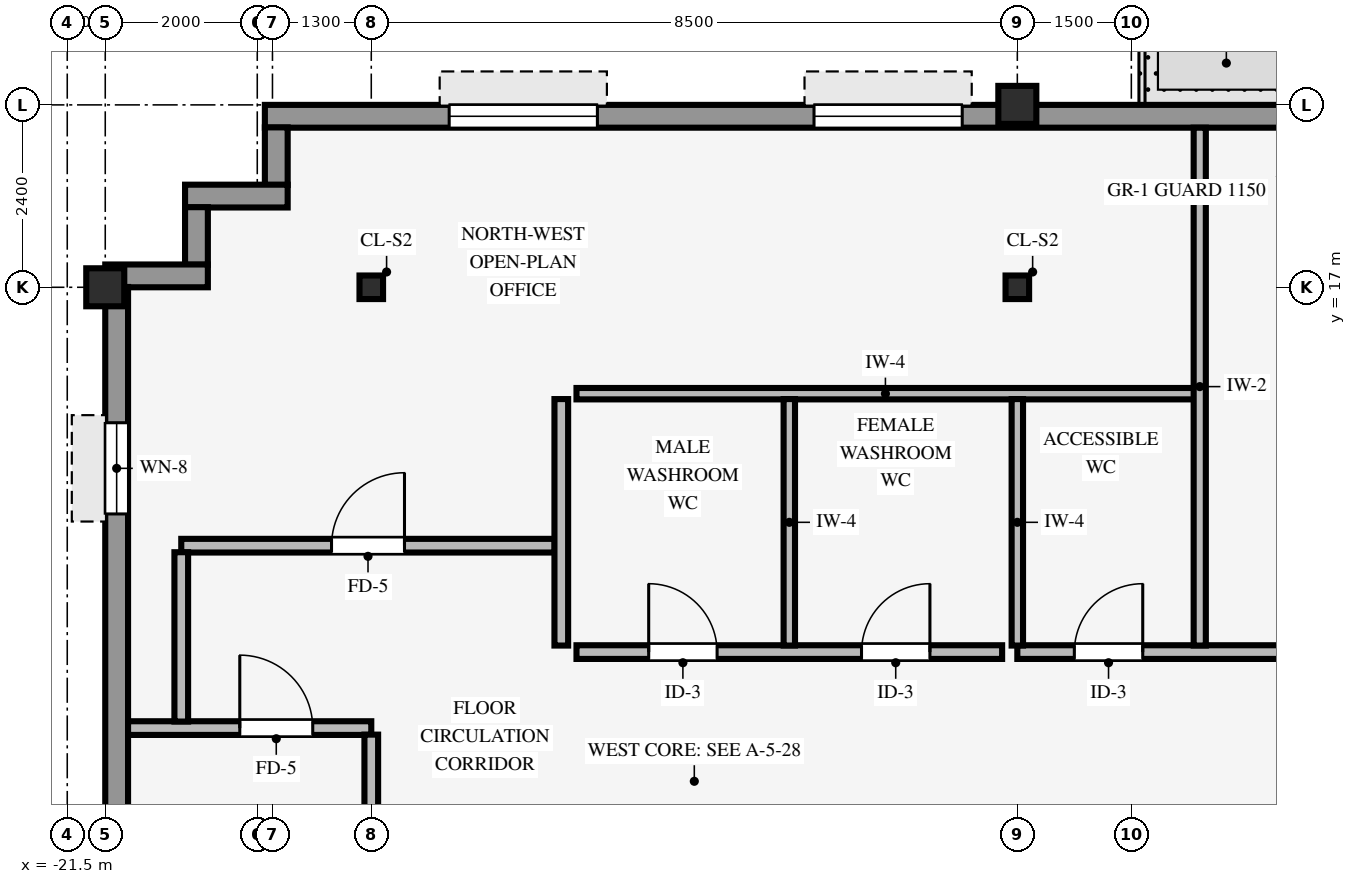
"""IFC4 building model, lengths in metres.
Left out: names, types, materials, properties, quantities, classifications, styles, units other than length and angle.
Written with IfcOpenShell. Run it as: python <this file> out.ifc"""

import sys

from ifc_helpers import new_model, si_unit, direction, frame, frame_2d, origin, origin_2d, place, context, subcontext, project, spatial, rectangle, hollow_rectangle, i_section, extrude, source, transform, mapped, element, fill, save


model = new_model("IFC4")
c1 = context("Model", 3, precision=1e-05, world=origin(), true_north=direction((0.0, 1.0)))
c2 = subcontext(c1, "Body", "Model", "MODEL_VIEW")
j1 = project(units=[si_unit("LENGTHUNIT", "METRE"), si_unit("PLANEANGLEUNIT", "RADIAN")], contexts=[c1])
p1 = place(None, origin())
s1 = spatial("IfcSite", under=j1, at=p1, CompositionType="ELEMENT")
p2 = place(p1, origin())
s2 = spatial("IfcBuilding", under=s1, at=p2, CompositionType="ELEMENT")
p3 = place(p2, frame((0.0, 0.0, 257.95)))
s3 = spatial("IfcBuildingStorey", under=s2, at=p3, CompositionType="ELEMENT", Elevation=257.95)
for number, where, z_axis, x_axis in (
    (1, (-21.0, 17.0, 0.0), (0.0, 0.0, 1.0), (1.0, 0.0, 0.0)),
    (2, (-9.0, 19.4, 0.0), (0.0, 0.0, 1.0), (1.0, 0.0, 0.0)),
):
    element("IfcColumn", number, at=place(p3, frame(where, z_axis=z_axis, x_axis=x_axis)), inside=s3, PredefinedType="COLUMN", context=c2, shape_type="SweptSolid", body=[
        extrude(hollow_rectangle(XDim=0.5, YDim=0.5, WallThickness=0.032, InnerFilletRadius=0.032, OuterFilletRadius=0.064, at=origin_2d()), origin(), (0.0, 0.0, 1.0), 3.37),
    ])
for number, where, z_axis, x_axis in (
    (3, (-17.5, 17.0, 0.0), (0.0, 0.0, 1.0), (1.0, 0.0, 0.0)),
    (4, (-9.0, 17.0, 0.0), (0.0, 0.0, 1.0), (1.0, 0.0, 0.0)),
):
    element("IfcColumn", number, at=place(p3, frame(where, z_axis=z_axis, x_axis=x_axis)), inside=s3, PredefinedType="COLUMN", context=c2, shape_type="SweptSolid", body=[
        extrude(i_section(OverallWidth=0.31, OverallDepth=0.31, WebThickness=0.015, FlangeThickness=0.015, FilletRadius=0.015, at=origin_2d()), origin(), (0.0, 0.0, 1.0), 3.37),
    ])
p4 = place(p3, frame((-18.9, 19.25, 0.0), z_axis=(0.0, 0.0, 1.0), x_axis=(1.0, 0.0, 0.0)))
e5 = element("IfcWall", 5, at=p4, inside=s3, PredefinedType="STANDARD", context=c2, shape_type="SweptSolid", body=[
    extrude(rectangle(XDim=35.6, YDim=0.3, at=frame_2d((17.8, 0.0))), origin(), (0.0, 0.0, 1.0), 2.705),
])
p5 = place(p4, frame((13.6, 0.0, 0.0)))
e6 = element("IfcOpeningElement", 6, at=p5, cuts=e5, PredefinedType="OPENING", context=c2, shape_type="SweptSolid", body=[
    extrude(rectangle(XDim=0.98, YDim=2.15, at=frame_2d((0.49, 1.075))), frame((0.0, 0.16, 0.0), z_axis=(0.0, -1.0, 0.0), x_axis=(1.0, 0.0, 0.0)), (0.0, 0.0, 1.0), 0.32),
])
p6 = place(p4, frame((2.425, 0.0, 0.8)))
e7 = element("IfcOpeningElement", 7, at=p6, cuts=e5, PredefinedType="OPENING", context=c2, shape_type="SweptSolid", body=[
    extrude(rectangle(XDim=1.95, YDim=1.48, at=frame_2d((0.975, 0.74))), frame((0.0, 0.16, 0.0), z_axis=(0.0, -1.0, 0.0), x_axis=(1.0, 0.0, 0.0)), (0.0, 0.0, 1.0), 0.32),
])
p7 = place(p4, frame((7.225, 0.0, 0.8)))
e8 = element("IfcOpeningElement", 8, at=p7, cuts=e5, PredefinedType="OPENING", context=c2, shape_type="SweptSolid", body=[
    extrude(rectangle(XDim=1.95, YDim=1.48, at=frame_2d((0.975, 0.74))), frame((0.0, 0.16, 0.0), z_axis=(0.0, -1.0, 0.0), x_axis=(1.0, 0.0, 0.0)), (0.0, 0.0, 1.0), 0.32),
])
p8 = place(p4, frame((15.475, 0.0, 0.8)))
e9 = element("IfcOpeningElement", 9, at=p8, cuts=e5, PredefinedType="OPENING", context=c2, shape_type="SweptSolid", body=[
    extrude(rectangle(XDim=1.95, YDim=1.48, at=frame_2d((0.975, 0.74))), frame((0.0, 0.16, 0.0), z_axis=(0.0, -1.0, 0.0), x_axis=(1.0, 0.0, 0.0)), (0.0, 0.0, 1.0), 0.32),
])
p9 = place(p4, frame((21.625, 0.0, 0.8)))
e10 = element("IfcOpeningElement", 10, at=p9, cuts=e5, PredefinedType="OPENING", context=c2, shape_type="SweptSolid", body=[
    extrude(rectangle(XDim=1.95, YDim=1.48, at=frame_2d((0.975, 0.74))), frame((0.0, 0.16, 0.0), z_axis=(0.0, -1.0, 0.0), x_axis=(1.0, 0.0, 0.0)), (0.0, 0.0, 1.0), 0.32),
])
p10 = place(p4, frame((32.575, 0.0, 0.8)))
e11 = element("IfcOpeningElement", 11, at=p10, cuts=e5, PredefinedType="OPENING", context=c2, shape_type="SweptSolid", body=[
    extrude(rectangle(XDim=1.95, YDim=1.48, at=frame_2d((0.975, 0.74))), frame((0.0, 0.16, 0.0), z_axis=(0.0, -1.0, 0.0), x_axis=(1.0, 0.0, 0.0)), (0.0, 0.0, 1.0), 0.32),
])
p11 = place(p3, frame((-18.75, 18.346, 0.0), z_axis=(0.0, 0.0, 1.0), x_axis=(0.0, 1.0, 0.0)))
e12 = element("IfcWall", 12, at=p11, inside=s3, PredefinedType="STANDARD", context=c2, shape_type="SweptSolid", body=[
    extrude(rectangle(XDim=0.758, YDim=0.3, at=frame_2d((0.379, 0.0))), origin(), (0.0, 0.0, 1.0), 2.892),
])
p12 = place(p3, frame((-19.95, 18.2, 0.0), z_axis=(0.0, 0.0, 1.0), x_axis=(1.0, 0.0, 0.0)))
e13 = element("IfcWall", 13, at=p12, inside=s3, PredefinedType="STANDARD", context=c2, shape_type="SweptSolid", body=[
    extrude(rectangle(XDim=1.35, YDim=0.3, at=frame_2d((0.675, 0.0))), origin(), (0.0, 0.0, 1.0), 2.892),
])
p13 = place(p3, frame((-19.8, 17.296, 0.0), z_axis=(0.0, 0.0, 1.0), x_axis=(0.0, 1.0, 0.0)))
e14 = element("IfcWall", 14, at=p13, inside=s3, PredefinedType="STANDARD", context=c2, shape_type="SweptSolid", body=[
    extrude(rectangle(XDim=0.758, YDim=0.3, at=frame_2d((0.379, 0.0))), origin(), (0.0, 0.0, 1.0), 2.892),
])
p14 = place(p3, frame((-21.0, 17.15, 0.0), z_axis=(0.0, 0.0, 1.0), x_axis=(1.0, 0.0, 0.0)))
e15 = element("IfcWall", 15, at=p14, inside=s3, PredefinedType="STANDARD", context=c2, shape_type="SweptSolid", body=[
    extrude(rectangle(XDim=1.35, YDim=0.3, at=frame_2d((0.675, 0.0))), origin(), (0.0, 0.0, 1.0), 2.892),
])
p15 = place(p3, frame((-20.85, -17.004, 0.0), z_axis=(0.0, 0.0, 1.0), x_axis=(0.0, 1.0, 0.0)))
e16 = element("IfcWall", 16, at=p15, inside=s3, PredefinedType="STANDARD", context=c2, shape_type="SweptSolid", body=[
    extrude(rectangle(XDim=34.008, YDim=0.3, at=frame_2d((17.004, 0.0))), origin(), (0.0, 0.0, 1.0), 2.705),
])
p16 = place(p15, frame((1.786, 0.0, 0.8)))
e17 = element("IfcOpeningElement", 17, at=p16, cuts=e16, PredefinedType="OPENING", context=c2, shape_type="SweptSolid", body=[
    extrude(rectangle(XDim=1.2, YDim=1.48, at=frame_2d((0.6, 0.74))), frame((0.0, 0.16, 0.0), z_axis=(0.0, -1.0, 0.0), x_axis=(1.0, 0.0, 0.0)), (0.0, 0.0, 1.0), 0.32),
])
p17 = place(p15, frame((8.159, 0.0, 0.8)))
e18 = element("IfcOpeningElement", 18, at=p17, cuts=e16, PredefinedType="OPENING", context=c2, shape_type="SweptSolid", body=[
    extrude(rectangle(XDim=1.2, YDim=1.48, at=frame_2d((0.6, 0.74))), frame((0.0, 0.16, 0.0), z_axis=(0.0, -1.0, 0.0), x_axis=(1.0, 0.0, 0.0)), (0.0, 0.0, 1.0), 0.32),
])
p18 = place(p15, frame((11.831, 0.0, 0.8)))
e19 = element("IfcOpeningElement", 19, at=p18, cuts=e16, PredefinedType="OPENING", context=c2, shape_type="SweptSolid", body=[
    extrude(rectangle(XDim=1.2, YDim=1.48, at=frame_2d((0.6, 0.74))), frame((0.0, 0.16, 0.0), z_axis=(0.0, -1.0, 0.0), x_axis=(1.0, 0.0, 0.0)), (0.0, 0.0, 1.0), 0.32),
])
p19 = place(p15, frame((17.754, 0.0, 0.8)))
e20 = element("IfcOpeningElement", 20, at=p19, cuts=e16, PredefinedType="OPENING", context=c2, shape_type="SweptSolid", body=[
    extrude(rectangle(XDim=1.2, YDim=1.48, at=frame_2d((0.6, 0.74))), frame((0.0, 0.16, 0.0), z_axis=(0.0, -1.0, 0.0), x_axis=(1.0, 0.0, 0.0)), (0.0, 0.0, 1.0), 0.32),
])
p20 = place(p15, frame((20.977, 0.0, 0.8)))
e21 = element("IfcOpeningElement", 21, at=p20, cuts=e16, PredefinedType="OPENING", context=c2, shape_type="SweptSolid", body=[
    extrude(rectangle(XDim=1.2, YDim=1.48, at=frame_2d((0.6, 0.74))), frame((0.0, 0.16, 0.0), z_axis=(0.0, -1.0, 0.0), x_axis=(1.0, 0.0, 0.0)), (0.0, 0.0, 1.0), 0.32),
])
p21 = place(p15, frame((24.649, 0.0, 0.8)))
e22 = element("IfcOpeningElement", 22, at=p21, cuts=e16, PredefinedType="OPENING", context=c2, shape_type="SweptSolid", body=[
    extrude(rectangle(XDim=1.2, YDim=1.48, at=frame_2d((0.6, 0.74))), frame((0.0, 0.16, 0.0), z_axis=(0.0, -1.0, 0.0), x_axis=(1.0, 0.0, 0.0)), (0.0, 0.0, 1.0), 0.32),
])
p22 = place(p15, frame((31.022, 0.0, 0.8)))
e23 = element("IfcOpeningElement", 23, at=p22, cuts=e16, PredefinedType="OPENING", context=c2, shape_type="SweptSolid", body=[
    extrude(rectangle(XDim=1.2, YDim=1.48, at=frame_2d((0.6, 0.74))), frame((0.0, 0.16, 0.0), z_axis=(0.0, -1.0, 0.0), x_axis=(1.0, 0.0, 0.0)), (0.0, 0.0, 1.0), 0.32),
])
p23 = place(p3, frame((-20.7, 11.2, 0.0), z_axis=(0.0, 0.0, 1.0), x_axis=(1.0, 0.0, 0.0)))
e24 = element("IfcWall", 24, at=p23, inside=s3, PredefinedType="PARTITIONING", context=c2, shape_type="SweptSolid", body=[
    extrude(rectangle(XDim=3.2, YDim=0.18, at=frame_2d((1.6, 0.0))), origin(), (0.0, 0.0, 1.0), 3.36),
])
p24 = place(p23, frame((1.47, 0.0, 0.0)))
e25 = element("IfcOpeningElement", 25, at=p24, cuts=e24, PredefinedType="OPENING", context=c2, shape_type="SweptSolid", body=[
    extrude(rectangle(XDim=0.96, YDim=2.1, at=frame_2d((0.48, 1.05))), frame((0.0, 0.1, 0.0), z_axis=(0.0, -1.0, 0.0), x_axis=(1.0, 0.0, 0.0)), (0.0, 0.0, 1.0), 0.2),
])
p25 = place(p3, frame((-14.8, 12.2, 0.0), z_axis=(0.0, 0.0, 1.0), x_axis=(1.0, 0.0, 0.0)))
e26 = element("IfcWall", 26, at=p25, inside=s3, PredefinedType="PARTITIONING", context=c2, shape_type="SweptSolid", body=[
    extrude(rectangle(XDim=5.6, YDim=0.18, at=frame_2d((2.8, 0.0))), origin(), (0.0, 0.0, 1.0), 3.36),
])
p26 = place(p25, frame((0.95, 0.0, 0.0)))
e27 = element("IfcOpeningElement", 27, at=p26, cuts=e26, PredefinedType="OPENING", context=c2, shape_type="SweptSolid", body=[
    extrude(rectangle(XDim=0.9, YDim=2.1, at=frame_2d((0.45, 1.05))), frame((0.0, 0.1, 0.0), z_axis=(0.0, -1.0, 0.0), x_axis=(1.0, 0.0, 0.0)), (0.0, 0.0, 1.0), 0.2),
])
p27 = place(p25, frame((3.75, 0.0, 0.0)))
e28 = element("IfcOpeningElement", 28, at=p27, cuts=e26, PredefinedType="OPENING", context=c2, shape_type="SweptSolid", body=[
    extrude(rectangle(XDim=0.9, YDim=2.1, at=frame_2d((0.45, 1.05))), frame((0.0, 0.1, 0.0), z_axis=(0.0, -1.0, 0.0), x_axis=(1.0, 0.0, 0.0)), (0.0, 0.0, 1.0), 0.2),
])
p28 = place(p3, frame((-9.0, 12.2, 0.0), z_axis=(0.0, 0.0, 1.0), x_axis=(1.0, 0.0, 0.0)))
e29 = element("IfcWall", 29, at=p28, inside=s3, PredefinedType="PARTITIONING", context=c2, shape_type="SweptSolid", body=[
    extrude(rectangle(XDim=24.8, YDim=0.18, at=frame_2d((12.4, 0.0))), origin(), (0.0, 0.0, 1.0), 3.36),
])
p29 = place(p28, frame((11.42, 0.0, 0.0)))
e30 = element("IfcOpeningElement", 30, at=p29, cuts=e29, PredefinedType="OPENING", context=c2, shape_type="SweptSolid", body=[
    extrude(rectangle(XDim=0.96, YDim=2.1, at=frame_2d((0.48, 1.05))), frame((0.0, 0.1, 0.0), z_axis=(0.0, -1.0, 0.0), x_axis=(1.0, 0.0, 0.0)), (0.0, 0.0, 1.0), 0.2),
])
p30 = place(p28, frame((4.82, 0.0, 0.0)))
e31 = element("IfcOpeningElement", 31, at=p30, cuts=e29, PredefinedType="OPENING", context=c2, shape_type="SweptSolid", body=[
    extrude(rectangle(XDim=0.96, YDim=2.1, at=frame_2d((0.48, 1.05))), frame((0.0, 0.1, 0.0), z_axis=(0.0, -1.0, 0.0), x_axis=(1.0, 0.0, 0.0)), (0.0, 0.0, 1.0), 0.2),
])
p31 = place(p28, frame((19.52, 0.0, 0.0)))
e32 = element("IfcOpeningElement", 32, at=p31, cuts=e29, PredefinedType="OPENING", context=c2, shape_type="SweptSolid", body=[
    extrude(rectangle(XDim=0.96, YDim=2.1, at=frame_2d((0.48, 1.05))), frame((0.0, 0.1, 0.0), z_axis=(0.0, -1.0, 0.0), x_axis=(1.0, 0.0, 0.0)), (0.0, 0.0, 1.0), 0.2),
])
p32 = place(p28, frame((22.92, 0.0, 0.0)))
e33 = element("IfcOpeningElement", 33, at=p32, cuts=e29, PredefinedType="OPENING", context=c2, shape_type="SweptSolid", body=[
    extrude(rectangle(XDim=0.96, YDim=2.1, at=frame_2d((0.48, 1.05))), frame((0.0, 0.1, 0.0), z_axis=(0.0, -1.0, 0.0), x_axis=(1.0, 0.0, 0.0)), (0.0, 0.0, 1.0), 0.2),
])
p33 = place(p28, frame((0.75, 0.0, 0.0)))
e34 = element("IfcOpeningElement", 34, at=p33, cuts=e29, PredefinedType="OPENING", context=c2, shape_type="SweptSolid", body=[
    extrude(rectangle(XDim=0.9, YDim=2.1, at=frame_2d((0.45, 1.05))), frame((0.0, 0.1, 0.0), z_axis=(0.0, -1.0, 0.0), x_axis=(1.0, 0.0, 0.0)), (0.0, 0.0, 1.0), 0.2),
])
p34 = place(p3, frame((-20.0, 13.6, 0.0), z_axis=(0.0, 0.0, 1.0), x_axis=(1.0, 0.0, 0.0)))
e35 = element("IfcWall", 35, at=p34, inside=s3, PredefinedType="PARTITIONING", context=c2, shape_type="SweptSolid", body=[
    extrude(rectangle(XDim=4.914, YDim=0.18, at=frame_2d((2.457, 0.0))), origin(), (0.0, 0.0, 1.0), 3.038),
])
p35 = place(p34, frame((1.977, 0.0, 0.0)))
e36 = element("IfcOpeningElement", 36, at=p35, cuts=e35, PredefinedType="OPENING", context=c2, shape_type="SweptSolid", body=[
    extrude(rectangle(XDim=0.96, YDim=2.1, at=frame_2d((0.48, 1.05))), frame((0.0, 0.1, 0.0), z_axis=(0.0, -1.0, 0.0), x_axis=(1.0, 0.0, 0.0)), (0.0, 0.0, 1.0), 0.2),
])
p36 = place(p3, frame((-14.8, 15.6, 0.0), z_axis=(0.0, 0.0, 1.0), x_axis=(1.0, 0.0, 0.0)))
e37 = element("IfcWall", 37, at=p36, inside=s3, PredefinedType="PARTITIONING", context=c2, shape_type="SweptSolid", body=[
    extrude(rectangle(XDim=8.129, YDim=0.15, at=frame_2d((4.064, 0.0))), origin(), (0.0, 0.0, 1.0), 3.36),
])
p37 = place(p3, frame((-20.0, 11.286, 0.0), z_axis=(0.0, 0.0, 1.0), x_axis=(0.0, 1.0, 0.0)))
e38 = element("IfcWall", 38, at=p37, inside=s3, PredefinedType="PARTITIONING", context=c2, shape_type="SweptSolid", body=[
    extrude(rectangle(XDim=2.228, YDim=0.18, at=frame_2d((1.114, 0.0))), origin(), (0.0, 0.0, 1.0), 3.36),
])
p38 = place(p3, frame((-17.5, 9.996, 0.0), z_axis=(0.0, 0.0, 1.0), x_axis=(0.0, 1.0, 0.0)))
e39 = element("IfcWall", 39, at=p38, inside=s3, PredefinedType="PARTITIONING", context=c2, shape_type="SweptSolid", body=[
    extrude(rectangle(XDim=1.118, YDim=0.18, at=frame_2d((0.559, 0.0))), origin(), (0.0, 0.0, 1.0), 2.892),
])
p39 = place(p3, frame((-15.0, 12.286, 0.0), z_axis=(0.0, 0.0, 1.0), x_axis=(0.0, 1.0, 0.0)))
e40 = element("IfcWall", 40, at=p39, inside=s3, PredefinedType="PARTITIONING", context=c2, shape_type="SweptSolid", body=[
    extrude(rectangle(XDim=3.243, YDim=0.18, at=frame_2d((1.622, 0.0))), origin(), (0.0, 0.0, 1.0), 3.36),
])
p40 = place(p3, frame((-12.0, 12.286, 0.0), z_axis=(0.0, 0.0, 1.0), x_axis=(0.0, 1.0, 0.0)))
e41 = element("IfcWall", 41, at=p40, inside=s3, PredefinedType="PARTITIONING", context=c2, shape_type="SweptSolid", body=[
    extrude(rectangle(XDim=3.243, YDim=0.15, at=frame_2d((1.622, 0.0))), origin(), (0.0, 0.0, 1.0), 3.36),
])
p41 = place(p3, frame((-9.0, 12.286, 0.0), z_axis=(0.0, 0.0, 1.0), x_axis=(0.0, 1.0, 0.0)))
e42 = element("IfcWall", 42, at=p41, inside=s3, PredefinedType="PARTITIONING", context=c2, shape_type="SweptSolid", body=[
    extrude(rectangle(XDim=3.243, YDim=0.15, at=frame_2d((1.622, 0.0))), origin(), (0.0, 0.0, 1.0), 2.892),
])
p42 = place(p3, frame((-6.6, 12.286, 0.0), z_axis=(0.0, 0.0, 1.0), x_axis=(0.0, 1.0, 0.0)))
e43 = element("IfcWall", 43, at=p42, inside=s3, PredefinedType="PARTITIONING", context=c2, shape_type="SweptSolid", body=[
    extrude(rectangle(XDim=6.814, YDim=0.16, at=frame_2d((3.407, 0.0))), origin(), (0.0, 0.0, 1.0), 3.36),
])
m1 = source(origin(), c2, "Body", "SweptSolid", [
    extrude(rectangle(XDim=1.95, YDim=1.48, at=frame_2d((0.975, 0.74))), frame((0.0, 0.03, 0.0), z_axis=(0.0, -1.0, 0.0), x_axis=(1.0, 0.0, 0.0)), (0.0, 0.0, 1.0), 0.06),
])
p43 = place(p6, origin())
e44 = element("IfcWindow", 44, at=p43, inside=s3, PartitioningType="SINGLE_PANEL", PredefinedType="WINDOW", context=c2, shape_type="MappedRepresentation", body=[
    mapped(m1, transform((0.0, 0.0, 0.0), scale=1.0)),
])
fill(e7, e44)
p44 = place(p7, origin())
e45 = element("IfcWindow", 45, at=p44, inside=s3, PartitioningType="SINGLE_PANEL", PredefinedType="WINDOW", context=c2, shape_type="MappedRepresentation", body=[
    mapped(m1, transform((0.0, 0.0, 0.0), scale=1.0)),
])
fill(e8, e45)
m2 = source(origin(), c2, "Body", "SweptSolid", [
    extrude(rectangle(XDim=1.2, YDim=1.48, at=frame_2d((0.6, 0.74))), frame((0.0, 0.03, 0.0), z_axis=(0.0, -1.0, 0.0), x_axis=(1.0, 0.0, 0.0)), (0.0, 0.0, 1.0), 0.06),
])
p45 = place(p22, origin())
e46 = element("IfcWindow", 46, at=p45, inside=s3, PartitioningType="SINGLE_PANEL", PredefinedType="WINDOW", context=c2, shape_type="MappedRepresentation", body=[
    mapped(m2, transform((0.0, 0.0, 0.0), scale=1.0)),
])
fill(e23, e46)
m3 = source(origin(), c2, "Body", "SweptSolid", [
    extrude(rectangle(XDim=0.96, YDim=2.1, at=frame_2d((0.48, 1.05))), frame((0.0, 0.025, 0.0), z_axis=(0.0, -1.0, 0.0), x_axis=(1.0, 0.0, 0.0)), (0.0, 0.0, 1.0), 0.05),
])
p46 = place(p35, origin())
e47 = element("IfcDoor", 47, at=p46, inside=s3, OperationType="SINGLE_SWING_RIGHT", PredefinedType="DOOR", context=c2, shape_type="MappedRepresentation", body=[
    mapped(m3, transform((0.0, 0.0, 0.0), scale=1.0)),
])
fill(e36, e47)
m4 = source(origin(), c2, "Body", "SweptSolid", [
    extrude(rectangle(XDim=0.9, YDim=2.1, at=frame_2d((0.45, 1.05))), frame((0.0, 0.025, 0.0), z_axis=(0.0, -1.0, 0.0), x_axis=(1.0, 0.0, 0.0)), (0.0, 0.0, 1.0), 0.05),
])
p47 = place(p26, origin())
e48 = element("IfcDoor", 48, at=p47, inside=s3, OperationType="SINGLE_SWING_LEFT", PredefinedType="DOOR", context=c2, shape_type="MappedRepresentation", body=[
    mapped(m4, transform((0.0, 0.0, 0.0), scale=1.0)),
])
fill(e27, e48)
p48 = place(p27, origin())
e49 = element("IfcDoor", 49, at=p48, inside=s3, OperationType="SINGLE_SWING_RIGHT", PredefinedType="DOOR", context=c2, shape_type="MappedRepresentation", body=[
    mapped(m4, transform((0.0, 0.0, 0.0), scale=1.0)),
])
fill(e28, e49)
p49 = place(p24, origin())
e50 = element("IfcDoor", 50, at=p49, inside=s3, OperationType="SINGLE_SWING_LEFT", PredefinedType="DOOR", context=c2, shape_type="MappedRepresentation", body=[
    mapped(m3, transform((0.0, 0.0, 0.0), scale=1.0)),
])
fill(e25, e50)
p50 = place(p33, origin())
e51 = element("IfcDoor", 51, at=p50, inside=s3, OperationType="SINGLE_SWING_RIGHT", PredefinedType="DOOR", context=c2, shape_type="MappedRepresentation", body=[
    mapped(m4, transform((0.0, 0.0, 0.0), scale=1.0)),
])
fill(e34, e51)
save(model, sys.argv[1])
